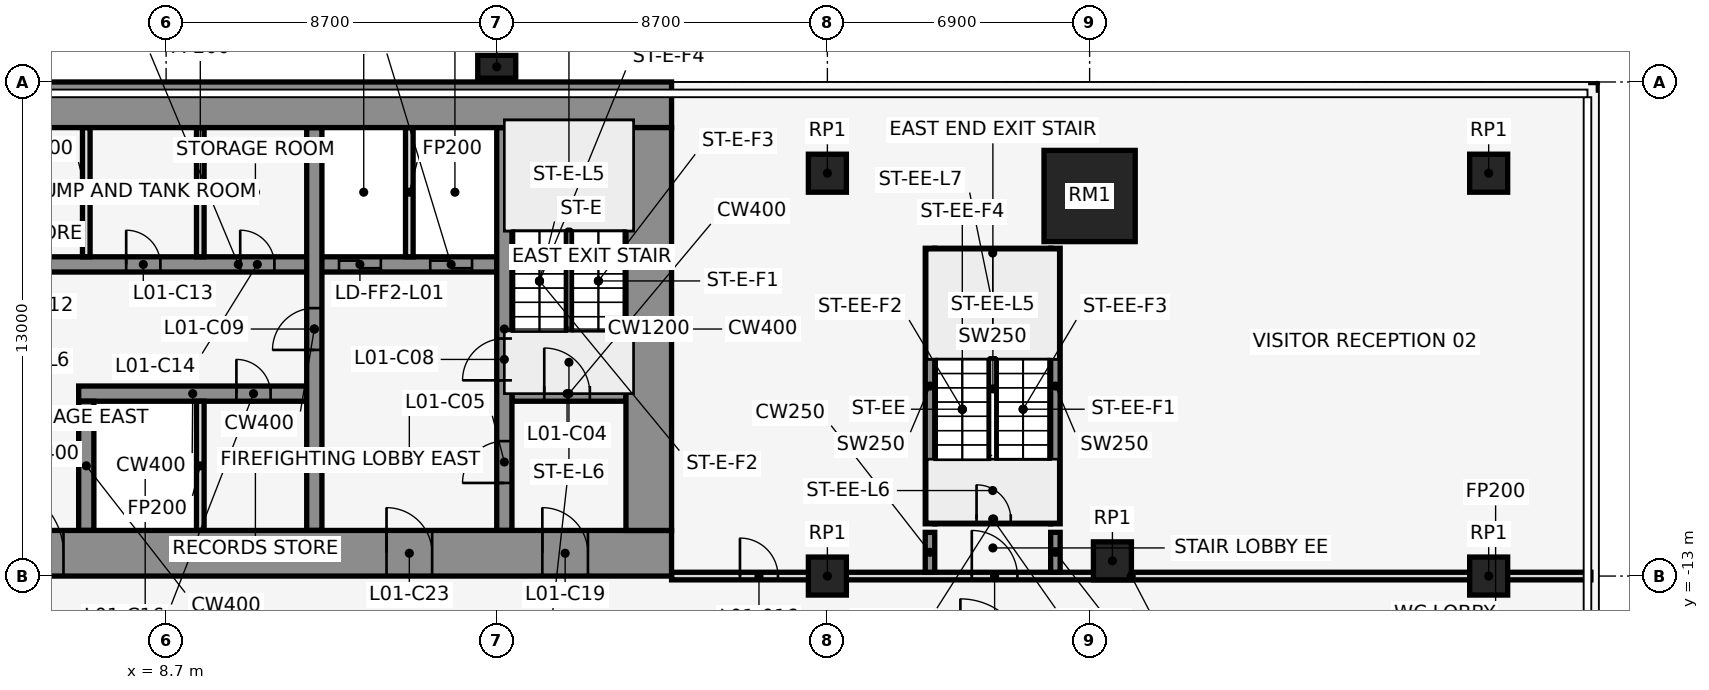
"""IFC4 building model, lengths in metres.
Left out: names, types, materials, properties, quantities, classifications, styles, units other than length and angle.
Written with IfcOpenShell. Run it as: python <this file> out.ifc"""

import sys

from ifc_helpers import new_model, si_unit, direction, frame, frame_2d, origin, origin_2d, place, context, subcontext, project, spatial, rectangle, extrude, element, fill, save


model = new_model("IFC4")
c1 = context("Model", 3, precision=1e-05, world=origin(), true_north=direction((0.0, 1.0)))
c2 = subcontext(c1, "Body", "Model", "MODEL_VIEW")
j1 = project(units=[si_unit("LENGTHUNIT", "METRE"), si_unit("PLANEANGLEUNIT", "RADIAN")], contexts=[c1])
p1 = place(None, origin())
s1 = spatial("IfcSite", under=j1, at=p1, CompositionType="ELEMENT")
p2 = place(p1, origin())
s2 = spatial("IfcBuilding", under=s1, at=p2, CompositionType="ELEMENT")
p3 = place(p2, frame((0.0, 0.0, 8.0)))
s3 = spatial("IfcBuildingStorey", under=s2, at=p3, CompositionType="ELEMENT", Elevation=8.0)
p4 = place(p3, frame((26.1, -2.4, 0.0), z_axis=(0.0, 0.0, 1.0), x_axis=(1.0, 0.0, 0.0)))
e1 = element("IfcColumn", 1, at=p4, inside=s3, PredefinedType="COLUMN", context=c2, shape_type="SweptSolid", body=[
    extrude(rectangle(XDim=1.0, YDim=1.0, at=origin_2d()), origin(), (0.0, 0.0, 1.0), 6.0),
])
p5 = place(p3, frame((33.0, -3.0, 0.0), z_axis=(0.0, 0.0, 1.0), x_axis=(1.0, 0.0, 0.0)))
e2 = element("IfcColumn", 2, at=p5, inside=s3, PredefinedType="COLUMN", context=c2, shape_type="SweptSolid", body=[
    extrude(rectangle(XDim=2.4, YDim=2.4, at=origin_2d()), origin(), (0.0, 0.0, 1.0), 6.0),
])
p6 = place(p3, frame((17.4, 0.4, 0.0), z_axis=(0.0, 0.0, 1.0), x_axis=(1.0, 0.0, 0.0)))
e3 = element("IfcColumn", 3, at=p6, inside=s3, PredefinedType="COLUMN", context=c2, shape_type="SweptSolid", body=[
    extrude(rectangle(XDim=1.0, YDim=0.6, at=origin_2d()), origin(), (0.0, 0.0, 1.0), 6.0),
])
for number, where, z_axis, x_axis in (
    (4, (33.6, -12.6, 0.0), (0.0, 0.0, 1.0), (1.0, 0.0, 0.0)),
    (5, (26.1, -13.0, 0.0), (0.0, 0.0, 1.0), (1.0, 0.0, 0.0)),
    (6, (43.5, -2.4, 0.0), (0.0, 0.0, 1.0), (1.0, 0.0, 0.0)),
    (7, (43.5, -13.0, 0.0), (0.0, 0.0, 1.0), (1.0, 0.0, 0.0)),
):
    element("IfcColumn", number, at=place(p3, frame(where, z_axis=z_axis, x_axis=x_axis)), inside=s3, PredefinedType="COLUMN", context=c2, shape_type="SweptSolid", body=[
        extrude(rectangle(XDim=1.0, YDim=1.0, at=origin_2d()), origin(), (0.0, 0.0, 1.0), 6.0),
    ])
for number, where, z_axis, x_axis in (
    (8, (28.8, -11.625, 0.0), (0.0, 0.0, 1.0), (0.0, 1.0, 0.0)),
    (9, (32.1, -11.625, 0.0), (0.0, 0.0, 1.0), (0.0, 1.0, 0.0)),
):
    element("IfcWall", number, at=place(p3, frame(where, z_axis=z_axis, x_axis=x_axis)), inside=s3, PredefinedType="SHEAR", context=c2, shape_type="SweptSolid", body=[
        extrude(rectangle(XDim=7.25, YDim=0.25, at=frame_2d((3.625, 0.0))), origin(), (0.0, 0.0, 1.0), 6.0),
    ])
p7 = place(p3, frame((28.925, -11.5, 0.0), z_axis=(0.0, 0.0, 1.0), x_axis=(1.0, 0.0, 0.0)))
e10 = element("IfcWall", 10, at=p7, inside=s3, PredefinedType="SHEAR", context=c2, shape_type="SweptSolid", body=[
    extrude(rectangle(XDim=3.05, YDim=0.25, at=frame_2d((1.525, 0.0))), origin(), (0.0, 0.0, 1.0), 6.0),
])
p8 = place(p7, frame((1.1, 0.0, 0.0)))
e11 = element("IfcOpeningElement", 11, at=p8, cuts=e10, PredefinedType="OPENING", context=c2, shape_type="SweptSolid", body=[
    extrude(rectangle(XDim=0.9, YDim=2.1, at=frame_2d((0.45, 1.05))), frame((0.0, 0.137, 0.0), z_axis=(0.0, -1.0, 0.0), x_axis=(1.0, 0.0, 0.0)), (0.0, 0.0, 1.0), 0.274),
])
p9 = place(p3, frame((28.925, -4.5, 0.0), z_axis=(0.0, 0.0, 1.0), x_axis=(1.0, 0.0, 0.0)))
e12 = element("IfcWall", 12, at=p9, inside=s3, PredefinedType="SHEAR", context=c2, shape_type="SweptSolid", body=[
    extrude(rectangle(XDim=3.05, YDim=0.25, at=frame_2d((1.525, 0.0))), origin(), (0.0, 0.0, 1.0), 6.0),
])
p10 = place(p3, frame((22.0, -13.0, 0.0), z_axis=(0.0, 0.0, 1.0), x_axis=(1.0, 0.0, 0.0)))
e13 = element("IfcWall", 13, at=p10, inside=s3, PredefinedType="PARTITIONING", context=c2, shape_type="SweptSolid", body=[
    extrude(rectangle(XDim=24.19, YDim=0.2, at=frame_2d((12.095, 0.0))), origin(), (0.0, 0.0, 1.0), 5.7),
])
p11 = place(p10, frame((7.9, 0.0, 0.0)))
e14 = element("IfcOpeningElement", 14, at=p11, cuts=e13, PredefinedType="OPENING", context=c2, shape_type="SweptSolid", body=[
    extrude(rectangle(XDim=1.2, YDim=2.1, at=frame_2d((0.6, 1.05))), frame((0.0, 0.112, 0.0), z_axis=(0.0, -1.0, 0.0), x_axis=(1.0, 0.0, 0.0)), (0.0, 0.0, 1.0), 0.224),
])
p12 = place(p10, frame((1.8, 0.0, 0.0)))
e15 = element("IfcOpeningElement", 15, at=p12, cuts=e13, PredefinedType="OPENING", context=c2, shape_type="SweptSolid", body=[
    extrude(rectangle(XDim=1.0, YDim=2.1, at=frame_2d((0.5, 1.05))), frame((0.0, 0.112, 0.0), z_axis=(0.0, -1.0, 0.0), x_axis=(1.0, 0.0, 0.0)), (0.0, 0.0, 1.0), 0.224),
])
for number, where, z_axis, x_axis in (
    (16, (28.8, -12.9, 0.0), (0.0, 0.0, 1.0), (0.0, 1.0, 0.0)),
    (17, (32.1, -12.9, 0.0), (0.0, 0.0, 1.0), (0.0, 1.0, 0.0)),
):
    element("IfcWall", number, at=place(p3, frame(where, z_axis=z_axis, x_axis=x_axis)), inside=s3, PredefinedType="SHEAR", context=c2, shape_type="SweptSolid", body=[
        extrude(rectangle(XDim=1.05, YDim=0.25, at=frame_2d((0.525, 0.0))), origin(), (0.0, 0.0, 1.0), 6.0),
    ])
p13 = place(p3, frame((6.4, -8.2, 0.0), z_axis=(0.0, 0.0, 1.0), x_axis=(1.0, 0.0, 0.0)))
e18 = element("IfcWall", 18, at=p13, inside=s3, PredefinedType="SHEAR", context=c2, shape_type="SweptSolid", body=[
    extrude(rectangle(XDim=6.0, YDim=0.4, at=frame_2d((3.0, 0.0))), origin(), (0.0, 0.0, 1.0), 6.0),
])
p14 = place(p13, frame((4.15, 0.0, 0.0)))
e19 = element("IfcOpeningElement", 19, at=p14, cuts=e18, PredefinedType="OPENING", context=c2, shape_type="SweptSolid", body=[
    extrude(rectangle(XDim=0.9, YDim=2.1, at=frame_2d((0.45, 1.05))), frame((0.0, 0.212, 0.0), z_axis=(0.0, -1.0, 0.0), x_axis=(1.0, 0.0, 0.0)), (0.0, 0.0, 1.0), 0.424),
])
p15 = place(p3, frame((17.8, -8.2, 0.0), z_axis=(0.0, 0.0, 1.0), x_axis=(1.0, 0.0, 0.0)))
e20 = element("IfcWall", 20, at=p15, inside=s3, PredefinedType="SHEAR", context=c2, shape_type="SweptSolid", body=[
    extrude(rectangle(XDim=3.0, YDim=0.4, at=frame_2d((1.5, 0.0))), origin(), (0.0, 0.0, 1.0), 6.0),
])
p16 = place(p15, frame((0.85, 0.0, 0.0)))
e21 = element("IfcOpeningElement", 21, at=p16, cuts=e20, PredefinedType="OPENING", context=c2, shape_type="SweptSolid", body=[
    extrude(rectangle(XDim=1.2, YDim=2.1, at=frame_2d((0.6, 1.05))), frame((0.0, 0.212, 0.0), z_axis=(0.0, -1.0, 0.0), x_axis=(1.0, 0.0, 0.0)), (0.0, 0.0, 1.0), 0.424),
])
p17 = place(p3, frame((3.8, -4.8, 0.0), z_axis=(0.0, 0.0, 1.0), x_axis=(1.0, 0.0, 0.0)))
e22 = element("IfcWall", 22, at=p17, inside=s3, PredefinedType="SHEAR", context=c2, shape_type="SweptSolid", body=[
    extrude(rectangle(XDim=13.6, YDim=0.4, at=frame_2d((6.8, 0.0))), origin(), (0.0, 0.0, 1.0), 6.0),
])
p18 = place(p17, frame((9.45, 0.0, 0.0)))
e23 = element("IfcOpeningElement", 23, at=p18, cuts=e22, PredefinedType="OPENING", context=c2, shape_type="SweptSolid", body=[
    extrude(rectangle(XDim=1.1, YDim=2.1, at=frame_2d((0.55, 1.05))), frame((0.0, 0.212, 0.0), z_axis=(0.0, -1.0, 0.0), x_axis=(1.0, 0.0, 0.0)), (0.0, 0.0, 1.0), 0.424),
])
p19 = place(p17, frame((11.85, 0.0, 0.0)))
e24 = element("IfcOpeningElement", 24, at=p19, cuts=e22, PredefinedType="OPENING", context=c2, shape_type="SweptSolid", body=[
    extrude(rectangle(XDim=1.1, YDim=2.1, at=frame_2d((0.55, 1.05))), frame((0.0, 0.212, 0.0), z_axis=(0.0, -1.0, 0.0), x_axis=(1.0, 0.0, 0.0)), (0.0, 0.0, 1.0), 0.424),
])
p20 = place(p17, frame((0.95, 0.0, 0.0)))
e25 = element("IfcOpeningElement", 25, at=p20, cuts=e22, PredefinedType="OPENING", context=c2, shape_type="SweptSolid", body=[
    extrude(rectangle(XDim=0.9, YDim=2.1, at=frame_2d((0.45, 1.05))), frame((0.0, 0.212, 0.0), z_axis=(0.0, -1.0, 0.0), x_axis=(1.0, 0.0, 0.0)), (0.0, 0.0, 1.0), 0.424),
])
p21 = place(p17, frame((3.85, 0.0, 0.0)))
e26 = element("IfcOpeningElement", 26, at=p21, cuts=e22, PredefinedType="OPENING", context=c2, shape_type="SweptSolid", body=[
    extrude(rectangle(XDim=0.9, YDim=2.1, at=frame_2d((0.45, 1.05))), frame((0.0, 0.212, 0.0), z_axis=(0.0, -1.0, 0.0), x_axis=(1.0, 0.0, 0.0)), (0.0, 0.0, 1.0), 0.424),
])
p22 = place(p17, frame((6.85, 0.0, 0.0)))
e27 = element("IfcOpeningElement", 27, at=p22, cuts=e22, PredefinedType="OPENING", context=c2, shape_type="SweptSolid", body=[
    extrude(rectangle(XDim=0.9, YDim=2.1, at=frame_2d((0.45, 1.05))), frame((0.0, 0.212, 0.0), z_axis=(0.0, -1.0, 0.0), x_axis=(1.0, 0.0, 0.0)), (0.0, 0.0, 1.0), 0.424),
])
p23 = place(p3, frame((6.6, -11.8, 0.0), z_axis=(0.0, 0.0, 1.0), x_axis=(0.0, 1.0, 0.0)))
e28 = element("IfcWall", 28, at=p23, inside=s3, PredefinedType="SHEAR", context=c2, shape_type="SweptSolid", body=[
    extrude(rectangle(XDim=3.4, YDim=0.4, at=frame_2d((1.7, 0.0))), origin(), (0.0, 0.0, 1.0), 6.0),
])
for number, where, z_axis, x_axis in (
    (29, (6.6, -4.6, 0.0), (0.0, 0.0, 1.0), (0.0, 1.0, 0.0)),
    (30, (9.6, -11.8, 0.0), (0.0, 0.0, 1.0), (0.0, 1.0, 0.0)),
    (31, (9.6, -4.6, 0.0), (0.0, 0.0, 1.0), (0.0, 1.0, 0.0)),
):
    element("IfcWall", number, at=place(p3, frame(where, z_axis=z_axis, x_axis=x_axis)), inside=s3, PredefinedType="PARTITIONING", context=c2, shape_type="SweptSolid", body=[
        extrude(rectangle(XDim=3.4, YDim=0.2, at=frame_2d((1.7, 0.0))), origin(), (0.0, 0.0, 1.0), 5.7),
    ])
p24 = place(p3, frame((12.6, -11.8, 0.0), z_axis=(0.0, 0.0, 1.0), x_axis=(0.0, 1.0, 0.0)))
e32 = element("IfcWall", 32, at=p24, inside=s3, PredefinedType="SHEAR", context=c2, shape_type="SweptSolid", body=[
    extrude(rectangle(XDim=10.6, YDim=0.4, at=frame_2d((5.3, 0.0))), origin(), (0.0, 0.0, 1.0), 6.0),
])
p25 = place(p24, frame((4.75, 0.0, 0.0)))
e33 = element("IfcOpeningElement", 33, at=p25, cuts=e32, PredefinedType="OPENING", context=c2, shape_type="SweptSolid", body=[
    extrude(rectangle(XDim=1.1, YDim=2.1, at=frame_2d((0.55, 1.05))), frame((0.0, 0.212, 0.0), z_axis=(0.0, -1.0, 0.0), x_axis=(1.0, 0.0, 0.0)), (0.0, 0.0, 1.0), 0.424),
])
p26 = place(p3, frame((15.1, -4.6, 0.0), z_axis=(0.0, 0.0, 1.0), x_axis=(0.0, 1.0, 0.0)))
e34 = element("IfcWall", 34, at=p26, inside=s3, PredefinedType="PARTITIONING", context=c2, shape_type="SweptSolid", body=[
    extrude(rectangle(XDim=3.4, YDim=0.2, at=frame_2d((1.7, 0.0))), origin(), (0.0, 0.0, 1.0), 5.7),
])
p27 = place(p3, frame((17.6, -11.8, 0.0), z_axis=(0.0, 0.0, 1.0), x_axis=(0.0, 1.0, 0.0)))
e35 = element("IfcWall", 35, at=p27, inside=s3, PredefinedType="SHEAR", context=c2, shape_type="SweptSolid", body=[
    extrude(rectangle(XDim=10.6, YDim=0.4, at=frame_2d((5.3, 0.0))), origin(), (0.0, 0.0, 1.0), 6.0),
])
p28 = place(p27, frame((1.25, 0.0, 0.0)))
e36 = element("IfcOpeningElement", 36, at=p28, cuts=e35, PredefinedType="OPENING", context=c2, shape_type="SweptSolid", body=[
    extrude(rectangle(XDim=1.1, YDim=2.1, at=frame_2d((0.55, 1.05))), frame((0.0, 0.212, 0.0), z_axis=(0.0, -1.0, 0.0), x_axis=(1.0, 0.0, 0.0)), (0.0, 0.0, 1.0), 0.424),
])
p29 = place(p27, frame((3.95, 0.0, 0.0)))
e37 = element("IfcOpeningElement", 37, at=p29, cuts=e35, PredefinedType="OPENING", context=c2, shape_type="SweptSolid", body=[
    extrude(rectangle(XDim=1.1, YDim=2.1, at=frame_2d((0.55, 1.05))), frame((0.0, 0.212, 0.0), z_axis=(0.0, -1.0, 0.0), x_axis=(1.0, 0.0, 0.0)), (0.0, 0.0, 1.0), 0.424),
])
p30 = place(p3, frame((-22.0, -0.6, 0.0), z_axis=(0.0, 0.0, 1.0), x_axis=(1.0, 0.0, 0.0)))
e38 = element("IfcWall", 38, at=p30, inside=s3, PredefinedType="SHEAR", context=c2, shape_type="SweptSolid", body=[
    extrude(rectangle(XDim=44.0, YDim=1.2, at=frame_2d((22.0, 0.0))), origin(), (0.0, 0.0, 1.0), 6.0),
])
p31 = place(p3, frame((-22.0, -12.4, 0.0), z_axis=(0.0, 0.0, 1.0), x_axis=(1.0, 0.0, 0.0)))
e39 = element("IfcWall", 39, at=p31, inside=s3, PredefinedType="SHEAR", context=c2, shape_type="SweptSolid", body=[
    extrude(rectangle(XDim=44.0, YDim=1.2, at=frame_2d((22.0, 0.0))), origin(), (0.0, 0.0, 1.0), 6.0),
])
p32 = place(p31, frame((2.2, 0.0, 0.0)))
e40 = element("IfcOpeningElement", 40, at=p32, cuts=e39, PredefinedType="OPENING", context=c2, shape_type="SweptSolid", body=[
    extrude(rectangle(XDim=1.2, YDim=2.1, at=frame_2d((0.6, 1.05))), frame((0.0, 0.612, 0.0), z_axis=(0.0, -1.0, 0.0), x_axis=(1.0, 0.0, 0.0)), (0.0, 0.0, 1.0), 1.224),
])
p33 = place(p31, frame((21.4, 0.0, 0.0)))
e41 = element("IfcOpeningElement", 41, at=p33, cuts=e39, PredefinedType="OPENING", context=c2, shape_type="SweptSolid", body=[
    extrude(rectangle(XDim=1.2, YDim=2.1, at=frame_2d((0.6, 1.05))), frame((0.0, 0.612, 0.0), z_axis=(0.0, -1.0, 0.0), x_axis=(1.0, 0.0, 0.0)), (0.0, 0.0, 1.0), 1.224),
])
p34 = place(p31, frame((40.6, 0.0, 0.0)))
e42 = element("IfcOpeningElement", 42, at=p34, cuts=e39, PredefinedType="OPENING", context=c2, shape_type="SweptSolid", body=[
    extrude(rectangle(XDim=1.2, YDim=2.1, at=frame_2d((0.6, 1.05))), frame((0.0, 0.612, 0.0), z_axis=(0.0, -1.0, 0.0), x_axis=(1.0, 0.0, 0.0)), (0.0, 0.0, 1.0), 1.224),
])
p35 = place(p31, frame((16.0, 0.0, 0.0)))
e43 = element("IfcOpeningElement", 43, at=p35, cuts=e39, PredefinedType="OPENING", context=c2, shape_type="SweptSolid", body=[
    extrude(rectangle(XDim=1.8, YDim=2.1, at=frame_2d((0.9, 1.05))), frame((0.0, 0.612, 0.0), z_axis=(0.0, -1.0, 0.0), x_axis=(1.0, 0.0, 0.0)), (0.0, 0.0, 1.0), 1.224),
])
p36 = place(p31, frame((6.3, 0.0, 0.0)))
e44 = element("IfcOpeningElement", 44, at=p36, cuts=e39, PredefinedType="OPENING", context=c2, shape_type="SweptSolid", body=[
    extrude(rectangle(XDim=1.2, YDim=2.1, at=frame_2d((0.6, 1.05))), frame((0.0, 0.612, 0.0), z_axis=(0.0, -1.0, 0.0), x_axis=(1.0, 0.0, 0.0)), (0.0, 0.0, 1.0), 1.224),
])
p37 = place(p31, frame((26.2, 0.0, 0.0)))
e45 = element("IfcOpeningElement", 45, at=p37, cuts=e39, PredefinedType="OPENING", context=c2, shape_type="SweptSolid", body=[
    extrude(rectangle(XDim=1.8, YDim=2.1, at=frame_2d((0.9, 1.05))), frame((0.0, 0.612, 0.0), z_axis=(0.0, -1.0, 0.0), x_axis=(1.0, 0.0, 0.0)), (0.0, 0.0, 1.0), 1.224),
])
p38 = place(p31, frame((36.5, 0.0, 0.0)))
e46 = element("IfcOpeningElement", 46, at=p38, cuts=e39, PredefinedType="OPENING", context=c2, shape_type="SweptSolid", body=[
    extrude(rectangle(XDim=1.2, YDim=2.1, at=frame_2d((0.6, 1.05))), frame((0.0, 0.612, 0.0), z_axis=(0.0, -1.0, 0.0), x_axis=(1.0, 0.0, 0.0)), (0.0, 0.0, 1.0), 1.224),
])
p39 = place(p3, frame((21.4, -11.8, 0.0), z_axis=(0.0, 0.0, 1.0), x_axis=(0.0, 1.0, 0.0)))
e47 = element("IfcWall", 47, at=p39, inside=s3, PredefinedType="SHEAR", context=c2, shape_type="SweptSolid", body=[
    extrude(rectangle(XDim=10.6, YDim=1.2, at=frame_2d((5.3, 0.0))), origin(), (0.0, 0.0, 1.0), 6.0),
])
p40 = place(p11, origin())
e48 = element("IfcDoor", 48, at=p40, inside=s3, OperationType="SINGLE_SWING_LEFT", PredefinedType="DOOR", context=c2, shape_type="SweptSolid", body=[
    extrude(rectangle(XDim=1.2, YDim=2.1, at=frame_2d((0.6, 1.05))), frame((0.0, 0.025, 0.0), z_axis=(0.0, -1.0, 0.0), x_axis=(1.0, 0.0, 0.0)), (0.0, 0.0, 1.0), 0.05),
])
fill(e14, e48)
p41 = place(p8, origin())
e49 = element("IfcDoor", 49, at=p41, inside=s3, OperationType="SINGLE_SWING_RIGHT", PredefinedType="DOOR", context=c2, shape_type="SweptSolid", body=[
    extrude(rectangle(XDim=0.9, YDim=2.1, at=frame_2d((0.45, 1.05))), frame((0.0, 0.025, 0.0), z_axis=(0.0, -1.0, 0.0), x_axis=(1.0, 0.0, 0.0)), (0.0, 0.0, 1.0), 0.05),
])
fill(e11, e49)
p42 = place(p12, origin())
e50 = element("IfcDoor", 50, at=p42, inside=s3, OperationType="SINGLE_SWING_LEFT", PredefinedType="DOOR", context=c2, shape_type="SweptSolid", body=[
    extrude(rectangle(XDim=1.0, YDim=2.1, at=frame_2d((0.5, 1.05))), frame((0.0, 0.025, 0.0), z_axis=(0.0, -1.0, 0.0), x_axis=(1.0, 0.0, 0.0)), (0.0, 0.0, 1.0), 0.05),
])
fill(e15, e50)
p43 = place(p16, origin())
e51 = element("IfcDoor", 51, at=p43, inside=s3, OperationType="SINGLE_SWING_RIGHT", PredefinedType="DOOR", context=c2, shape_type="SweptSolid", body=[
    extrude(rectangle(XDim=1.2, YDim=2.1, at=frame_2d((0.6, 1.05))), frame((0.0, 0.025, 0.0), z_axis=(0.0, -1.0, 0.0), x_axis=(1.0, 0.0, 0.0)), (0.0, 0.0, 1.0), 0.05),
])
fill(e21, e51)
p44 = place(p28, origin())
e52 = element("IfcDoor", 52, at=p44, inside=s3, OperationType="SINGLE_SWING_LEFT", PredefinedType="DOOR", context=c2, shape_type="SweptSolid", body=[
    extrude(rectangle(XDim=1.1, YDim=2.1, at=frame_2d((0.55, 1.05))), frame((0.0, 0.025, 0.0), z_axis=(0.0, -1.0, 0.0), x_axis=(1.0, 0.0, 0.0)), (0.0, 0.0, 1.0), 0.05),
])
fill(e36, e52)
p45 = place(p18, origin())
e53 = element("IfcDoor", 53, at=p45, inside=s3, OperationType="DOUBLE_DOOR_SLIDING", PredefinedType="DOOR", context=c2, shape_type="SweptSolid", body=[
    extrude(rectangle(XDim=1.1, YDim=2.1, at=frame_2d((0.55, 1.05))), frame((0.0, 0.025, 0.0), z_axis=(0.0, -1.0, 0.0), x_axis=(1.0, 0.0, 0.0)), (0.0, 0.0, 1.0), 0.05),
])
fill(e23, e53)
p46 = place(p19, origin())
e54 = element("IfcDoor", 54, at=p46, inside=s3, OperationType="DOUBLE_DOOR_SLIDING", PredefinedType="DOOR", context=c2, shape_type="SweptSolid", body=[
    extrude(rectangle(XDim=1.1, YDim=2.1, at=frame_2d((0.55, 1.05))), frame((0.0, 0.025, 0.0), z_axis=(0.0, -1.0, 0.0), x_axis=(1.0, 0.0, 0.0)), (0.0, 0.0, 1.0), 0.05),
])
fill(e24, e54)
p47 = place(p29, origin())
e55 = element("IfcDoor", 55, at=p47, inside=s3, OperationType="SINGLE_SWING_RIGHT", PredefinedType="DOOR", context=c2, shape_type="SweptSolid", body=[
    extrude(rectangle(XDim=1.1, YDim=2.1, at=frame_2d((0.55, 1.05))), frame((0.0, 0.025, 0.0), z_axis=(0.0, -1.0, 0.0), x_axis=(1.0, 0.0, 0.0)), (0.0, 0.0, 1.0), 0.05),
])
fill(e37, e55)
p48 = place(p25, frame((1.1, 0.0, 0.0), z_axis=(0.0, 0.0, 1.0), x_axis=(-1.0, 0.0, 0.0)))
e56 = element("IfcDoor", 56, at=p48, inside=s3, OperationType="SINGLE_SWING_RIGHT", PredefinedType="DOOR", context=c2, shape_type="SweptSolid", body=[
    extrude(rectangle(XDim=1.1, YDim=2.1, at=frame_2d((0.55, 1.05))), frame((0.0, 0.025, 0.0), z_axis=(0.0, -1.0, 0.0), x_axis=(1.0, 0.0, 0.0)), (0.0, 0.0, 1.0), 0.05),
])
fill(e33, e56)
p49 = place(p21, origin())
e57 = element("IfcDoor", 57, at=p49, inside=s3, OperationType="SINGLE_SWING_LEFT", PredefinedType="DOOR", context=c2, shape_type="SweptSolid", body=[
    extrude(rectangle(XDim=0.9, YDim=2.1, at=frame_2d((0.45, 1.05))), frame((0.0, 0.025, 0.0), z_axis=(0.0, -1.0, 0.0), x_axis=(1.0, 0.0, 0.0)), (0.0, 0.0, 1.0), 0.05),
])
fill(e26, e57)
p50 = place(p22, origin())
e58 = element("IfcDoor", 58, at=p50, inside=s3, OperationType="SINGLE_SWING_RIGHT", PredefinedType="DOOR", context=c2, shape_type="SweptSolid", body=[
    extrude(rectangle(XDim=0.9, YDim=2.1, at=frame_2d((0.45, 1.05))), frame((0.0, 0.025, 0.0), z_axis=(0.0, -1.0, 0.0), x_axis=(1.0, 0.0, 0.0)), (0.0, 0.0, 1.0), 0.05),
])
fill(e27, e58)
p51 = place(p14, frame((0.9, 0.0, 0.0), z_axis=(0.0, 0.0, 1.0), x_axis=(-1.0, 0.0, 0.0)))
e59 = element("IfcDoor", 59, at=p51, inside=s3, OperationType="SINGLE_SWING_LEFT", PredefinedType="DOOR", context=c2, shape_type="SweptSolid", body=[
    extrude(rectangle(XDim=0.9, YDim=2.1, at=frame_2d((0.45, 1.05))), frame((0.0, 0.025, 0.0), z_axis=(0.0, -1.0, 0.0), x_axis=(1.0, 0.0, 0.0)), (0.0, 0.0, 1.0), 0.05),
])
fill(e19, e59)
p52 = place(p34, frame((1.2, 0.0, 0.0), z_axis=(0.0, 0.0, 1.0), x_axis=(-1.0, 0.0, 0.0)))
e60 = element("IfcDoor", 60, at=p52, inside=s3, OperationType="SINGLE_SWING_RIGHT", PredefinedType="DOOR", context=c2, shape_type="SweptSolid", body=[
    extrude(rectangle(XDim=1.2, YDim=2.1, at=frame_2d((0.6, 1.05))), frame((0.0, 0.025, 0.0), z_axis=(0.0, -1.0, 0.0), x_axis=(1.0, 0.0, 0.0)), (0.0, 0.0, 1.0), 0.05),
])
fill(e42, e60)
p53 = place(p37, origin())
e61 = element("IfcDoor", 61, at=p53, inside=s3, OperationType="SINGLE_SWING_LEFT", PredefinedType="DOOR", context=c2, shape_type="SweptSolid", body=[
    extrude(rectangle(XDim=1.8, YDim=2.1, at=frame_2d((0.9, 1.05))), frame((0.0, 0.025, 0.0), z_axis=(0.0, -1.0, 0.0), x_axis=(1.0, 0.0, 0.0)), (0.0, 0.0, 1.0), 0.05),
])
fill(e45, e61)
p54 = place(p38, frame((1.2, 0.0, 0.0), z_axis=(0.0, 0.0, 1.0), x_axis=(-1.0, 0.0, 0.0)))
e62 = element("IfcDoor", 62, at=p54, inside=s3, OperationType="SINGLE_SWING_RIGHT", PredefinedType="DOOR", context=c2, shape_type="SweptSolid", body=[
    extrude(rectangle(XDim=1.2, YDim=2.1, at=frame_2d((0.6, 1.05))), frame((0.0, 0.025, 0.0), z_axis=(0.0, -1.0, 0.0), x_axis=(1.0, 0.0, 0.0)), (0.0, 0.0, 1.0), 0.05),
])
fill(e46, e62)
save(model, sys.argv[1])
